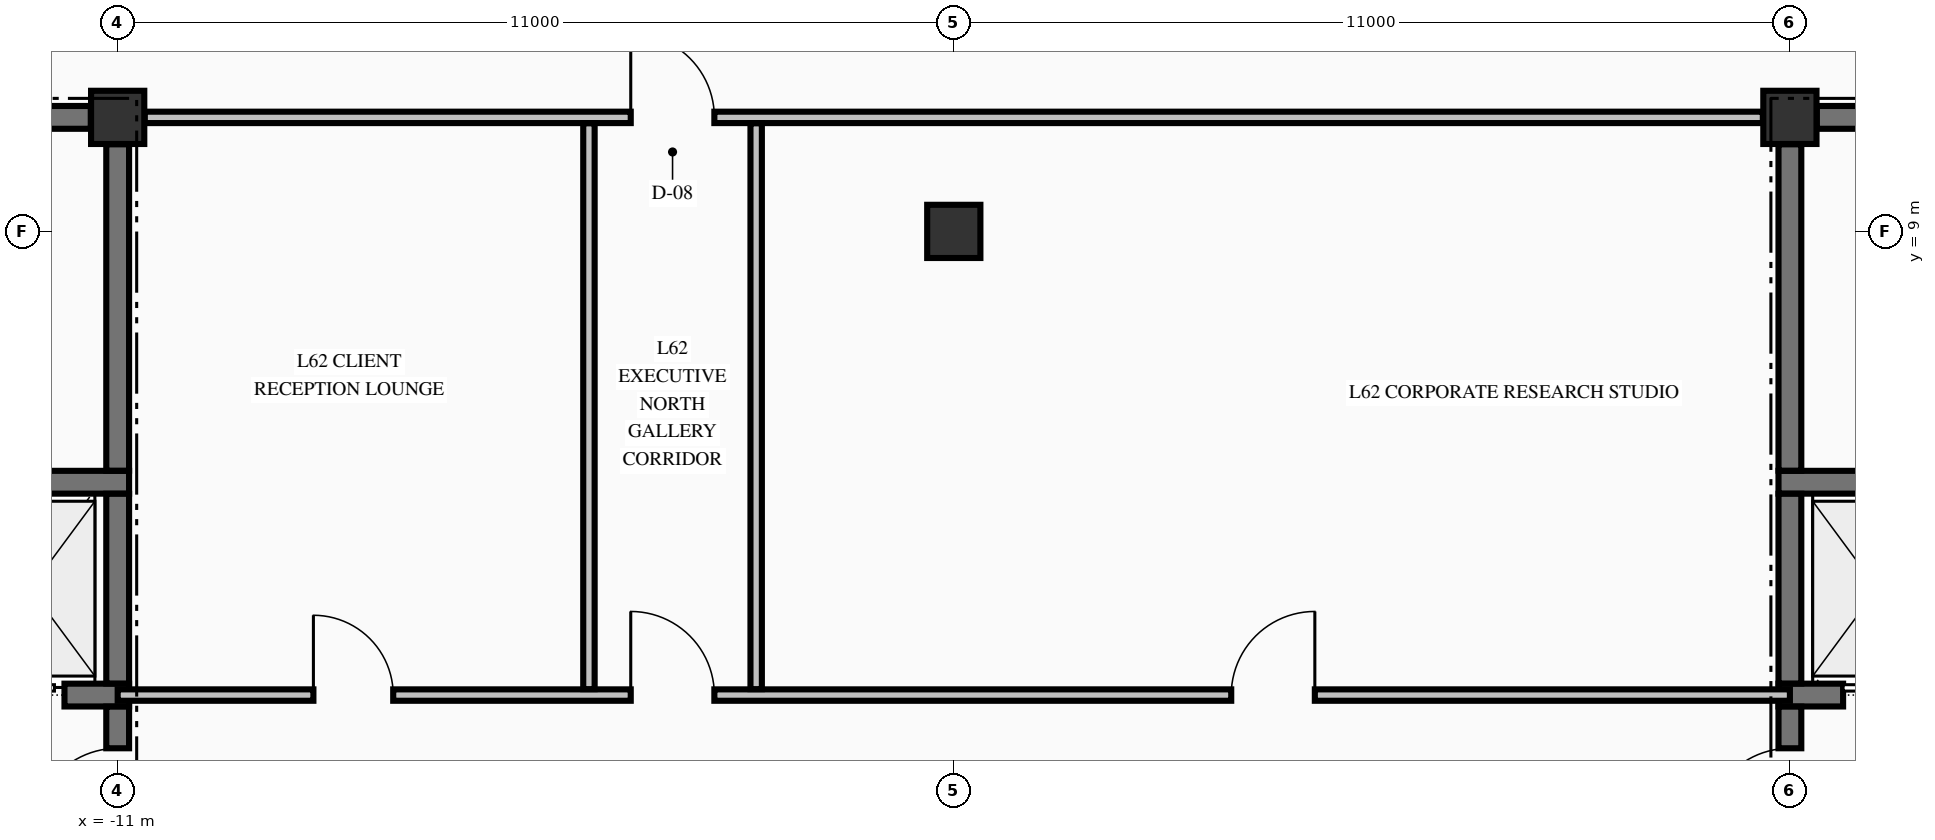
"""IFC4 building model, lengths in metres.
Left out: names, types, materials, properties, quantities, classifications, styles, units other than length and angle.
Written with IfcOpenShell. Run it as: python <this file> out.ifc"""

import sys

from ifc_helpers import new_model, si_unit, direction, frame, frame_2d, origin, origin_2d, place, context, subcontext, project, spatial, rectangle, extrude, element, fill, save


model = new_model("IFC4")
c1 = context("Model", 3, precision=1e-05, world=origin(), true_north=direction((0.0, 1.0)))
c2 = subcontext(c1, "Body", "Model", "MODEL_VIEW")
j1 = project(units=[si_unit("LENGTHUNIT", "METRE"), si_unit("PLANEANGLEUNIT", "RADIAN")], contexts=[c1])
p1 = place(None, origin())
s1 = spatial("IfcSite", under=j1, at=p1, CompositionType="ELEMENT")
p2 = place(p1, origin())
s2 = spatial("IfcBuilding", under=s1, at=p2, CompositionType="ELEMENT")
p3 = place(p2, frame((0.0, 0.0, 236.51)))
s3 = spatial("IfcBuildingStorey", under=s2, at=p3, CompositionType="ELEMENT", Elevation=236.51)
for number, where, z_axis, x_axis in (
    (1, (-11.0, 10.5, -0.25), (0.0, 0.0, 1.0), (1.0, 0.0, 0.0)),
    (2, (11.0, 10.5, -0.25), (0.0, 0.0, 1.0), (1.0, 0.0, 0.0)),
    (3, (0.0, 9.0, -0.25), (0.0, 0.0, 1.0), (1.0, 0.0, 0.0)),
):
    element("IfcColumn", number, at=place(p3, frame(where, z_axis=z_axis, x_axis=x_axis)), inside=s3, PredefinedType="COLUMN", context=c2, shape_type="SweptSolid", body=[
        extrude(rectangle(XDim=0.7, YDim=0.7, at=origin_2d()), origin(), (0.0, 0.0, 1.0), 3.23),
    ])
p4 = place(p3, frame((-14.875, 2.9, 0.0), z_axis=(0.0, 0.0, 1.0), x_axis=(1.0, 0.0, 0.0)))
e4 = element("IfcWall", 4, at=p4, inside=s3, PredefinedType="SHEAR", context=c2, shape_type="SweptSolid", body=[
    extrude(rectangle(XDim=4.025, YDim=0.3, at=frame_2d((2.012, 0.0))), origin(), (0.0, 0.0, 1.0), 2.98),
])
p5 = place(p4, frame((2.075, 0.0, 0.0)))
e5 = element("IfcOpeningElement", 5, at=p5, cuts=e4, PredefinedType="OPENING", context=c2, shape_type="SweptSolid", body=[
    extrude(rectangle(XDim=1.1, YDim=2.2, at=frame_2d((0.55, 1.1))), frame((0.0, 0.16, 0.0), z_axis=(0.0, -1.0, 0.0), x_axis=(1.0, 0.0, 0.0)), (0.0, 0.0, 1.0), 0.32),
])
p6 = place(p3, frame((10.85, 2.9, 0.0), z_axis=(0.0, 0.0, 1.0), x_axis=(1.0, 0.0, 0.0)))
e6 = element("IfcWall", 6, at=p6, inside=s3, PredefinedType="SHEAR", context=c2, shape_type="SweptSolid", body=[
    extrude(rectangle(XDim=4.025, YDim=0.3, at=frame_2d((2.012, 0.0))), origin(), (0.0, 0.0, 1.0), 2.98),
])
p7 = place(p6, frame((0.85, 0.0, 0.0)))
e7 = element("IfcOpeningElement", 7, at=p7, cuts=e6, PredefinedType="OPENING", context=c2, shape_type="SweptSolid", body=[
    extrude(rectangle(XDim=1.1, YDim=2.2, at=frame_2d((0.55, 1.1))), frame((0.0, 0.16, 0.0), z_axis=(0.0, -1.0, 0.0), x_axis=(1.0, 0.0, 0.0)), (0.0, 0.0, 1.0), 0.32),
])
for number, where, z_axis, x_axis in (
    (8, (-14.875, 5.7, 0.0), (0.0, 0.0, 1.0), (1.0, 0.0, 0.0)),
    (9, (10.85, 5.7, 0.0), (0.0, 0.0, 1.0), (1.0, 0.0, 0.0)),
):
    element("IfcWall", number, at=place(p3, frame(where, z_axis=z_axis, x_axis=x_axis)), inside=s3, PredefinedType="SHEAR", context=c2, shape_type="SweptSolid", body=[
        extrude(rectangle(XDim=4.025, YDim=0.3, at=frame_2d((2.012, 0.0))), origin(), (0.0, 0.0, 1.0), 2.98),
    ])
p8 = place(p3, frame((-14.7, 10.5, 0.0), z_axis=(0.0, 0.0, 1.0), x_axis=(1.0, 0.0, 0.0)))
e10 = element("IfcWall", 10, at=p8, inside=s3, PredefinedType="SHEAR", context=c2, shape_type="SweptSolid", body=[
    extrude(rectangle(XDim=3.346, YDim=0.3, at=frame_2d((1.673, 0.0))), origin(), (0.0, 0.0, 1.0), 2.98),
])
p9 = place(p8, frame((0.775, 0.0, 0.0)))
e11 = element("IfcOpeningElement", 11, at=p9, cuts=e10, PredefinedType="OPENING", context=c2, shape_type="SweptSolid", body=[
    extrude(rectangle(XDim=0.95, YDim=2.15, at=frame_2d((0.475, 1.075))), frame((0.0, 0.16, 0.0), z_axis=(0.0, -1.0, 0.0), x_axis=(1.0, 0.0, 0.0)), (0.0, 0.0, 1.0), 0.32),
])
p10 = place(p3, frame((11.354, 10.5, 0.0), z_axis=(0.0, 0.0, 1.0), x_axis=(1.0, 0.0, 0.0)))
e12 = element("IfcWall", 12, at=p10, inside=s3, PredefinedType="SHEAR", context=c2, shape_type="SweptSolid", body=[
    extrude(rectangle(XDim=3.346, YDim=0.3, at=frame_2d((1.673, 0.0))), origin(), (0.0, 0.0, 1.0), 2.98),
])
p11 = place(p10, frame((1.621, 0.0, 0.0)))
e13 = element("IfcOpeningElement", 13, at=p11, cuts=e12, PredefinedType="OPENING", context=c2, shape_type="SweptSolid", body=[
    extrude(rectangle(XDim=0.95, YDim=2.15, at=frame_2d((0.475, 1.075))), frame((0.0, 0.16, 0.0), z_axis=(0.0, -1.0, 0.0), x_axis=(1.0, 0.0, 0.0)), (0.0, 0.0, 1.0), 0.32),
])
p12 = place(p3, frame((-11.0, 2.9, 0.0), z_axis=(0.0, 0.0, 1.0), x_axis=(1.0, 0.0, 0.0)))
e14 = element("IfcWall", 14, at=p12, inside=s3, PredefinedType="PARTITIONING", context=c2, shape_type="SweptSolid", body=[
    extrude(rectangle(XDim=22.0, YDim=0.15, at=frame_2d((11.0, 0.0))), origin(), (0.0, 0.0, 1.0), 2.98),
])
p13 = place(p12, frame((6.75, 0.0, 0.0)))
e15 = element("IfcOpeningElement", 15, at=p13, cuts=e14, PredefinedType="OPENING", context=c2, shape_type="SweptSolid", body=[
    extrude(rectangle(XDim=1.1, YDim=2.15, at=frame_2d((0.55, 1.075))), frame((0.0, 0.085, 0.0), z_axis=(0.0, -1.0, 0.0), x_axis=(1.0, 0.0, 0.0)), (0.0, 0.0, 1.0), 0.17),
])
p14 = place(p12, frame((2.575, 0.0, 0.0)))
e16 = element("IfcOpeningElement", 16, at=p14, cuts=e14, PredefinedType="OPENING", context=c2, shape_type="SweptSolid", body=[
    extrude(rectangle(XDim=1.05, YDim=2.15, at=frame_2d((0.525, 1.075))), frame((0.0, 0.085, 0.0), z_axis=(0.0, -1.0, 0.0), x_axis=(1.0, 0.0, 0.0)), (0.0, 0.0, 1.0), 0.17),
])
p15 = place(p12, frame((14.65, 0.0, 0.0)))
e17 = element("IfcOpeningElement", 17, at=p15, cuts=e14, PredefinedType="OPENING", context=c2, shape_type="SweptSolid", body=[
    extrude(rectangle(XDim=1.1, YDim=2.15, at=frame_2d((0.55, 1.075))), frame((0.0, 0.085, 0.0), z_axis=(0.0, -1.0, 0.0), x_axis=(1.0, 0.0, 0.0)), (0.0, 0.0, 1.0), 0.17),
])
p16 = place(p3, frame((-10.644, 10.5, 0.0), z_axis=(0.0, 0.0, 1.0), x_axis=(1.0, 0.0, 0.0)))
e18 = element("IfcWall", 18, at=p16, inside=s3, PredefinedType="PARTITIONING", context=c2, shape_type="SweptSolid", body=[
    extrude(rectangle(XDim=21.288, YDim=0.15, at=frame_2d((10.644, 0.0))), origin(), (0.0, 0.0, 1.0), 2.98),
])
p17 = place(p16, frame((6.394, 0.0, 0.0)))
e19 = element("IfcOpeningElement", 19, at=p17, cuts=e18, PredefinedType="OPENING", context=c2, shape_type="SweptSolid", body=[
    extrude(rectangle(XDim=1.1, YDim=2.15, at=frame_2d((0.55, 1.075))), frame((0.0, 0.085, 0.0), z_axis=(0.0, -1.0, 0.0), x_axis=(1.0, 0.0, 0.0)), (0.0, 0.0, 1.0), 0.17),
])
p18 = place(p3, frame((-11.0, 0.354, 0.0), z_axis=(0.0, 0.0, 1.0), x_axis=(0.0, 1.0, 0.0)))
e20 = element("IfcWall", 20, at=p18, inside=s3, PredefinedType="SHEAR", context=c2, shape_type="SweptSolid", body=[
    extrude(rectangle(XDim=2.394, YDim=0.3, at=frame_2d((1.197, 0.0))), origin(), (0.0, 0.0, 1.0), 2.98),
])
p19 = place(p18, frame((0.746, 0.0, 0.0)))
e21 = element("IfcOpeningElement", 21, at=p19, cuts=e20, PredefinedType="OPENING", context=c2, shape_type="SweptSolid", body=[
    extrude(rectangle(XDim=1.1, YDim=2.15, at=frame_2d((0.55, 1.075))), frame((0.0, 0.16, 0.0), z_axis=(0.0, -1.0, 0.0), x_axis=(1.0, 0.0, 0.0)), (0.0, 0.0, 1.0), 0.32),
])
p20 = place(p3, frame((-11.0, 3.052, 0.0), z_axis=(0.0, 0.0, 1.0), x_axis=(0.0, 1.0, 0.0)))
e22 = element("IfcWall", 22, at=p20, inside=s3, PredefinedType="SHEAR", context=c2, shape_type="SweptSolid", body=[
    extrude(rectangle(XDim=2.496, YDim=0.3, at=frame_2d((1.248, 0.0))), origin(), (0.0, 0.0, 1.0), 2.98),
])
p21 = place(p3, frame((-11.0, 5.852, 0.0), z_axis=(0.0, 0.0, 1.0), x_axis=(0.0, 1.0, 0.0)))
e23 = element("IfcWall", 23, at=p21, inside=s3, PredefinedType="SHEAR", context=c2, shape_type="SweptSolid", body=[
    extrude(rectangle(XDim=4.294, YDim=0.3, at=frame_2d((2.147, 0.0))), origin(), (0.0, 0.0, 1.0), 2.98),
])
p22 = place(p3, frame((11.0, 0.354, 0.0), z_axis=(0.0, 0.0, 1.0), x_axis=(0.0, 1.0, 0.0)))
e24 = element("IfcWall", 24, at=p22, inside=s3, PredefinedType="SHEAR", context=c2, shape_type="SweptSolid", body=[
    extrude(rectangle(XDim=2.394, YDim=0.3, at=frame_2d((1.197, 0.0))), origin(), (0.0, 0.0, 1.0), 2.98),
])
p23 = place(p22, frame((0.746, 0.0, 0.0)))
e25 = element("IfcOpeningElement", 25, at=p23, cuts=e24, PredefinedType="OPENING", context=c2, shape_type="SweptSolid", body=[
    extrude(rectangle(XDim=1.1, YDim=2.15, at=frame_2d((0.55, 1.075))), frame((0.0, 0.16, 0.0), z_axis=(0.0, -1.0, 0.0), x_axis=(1.0, 0.0, 0.0)), (0.0, 0.0, 1.0), 0.32),
])
p24 = place(p3, frame((11.0, 3.052, 0.0), z_axis=(0.0, 0.0, 1.0), x_axis=(0.0, 1.0, 0.0)))
e26 = element("IfcWall", 26, at=p24, inside=s3, PredefinedType="SHEAR", context=c2, shape_type="SweptSolid", body=[
    extrude(rectangle(XDim=2.496, YDim=0.3, at=frame_2d((1.248, 0.0))), origin(), (0.0, 0.0, 1.0), 2.98),
])
p25 = place(p3, frame((11.0, 5.852, 0.0), z_axis=(0.0, 0.0, 1.0), x_axis=(0.0, 1.0, 0.0)))
e27 = element("IfcWall", 27, at=p25, inside=s3, PredefinedType="SHEAR", context=c2, shape_type="SweptSolid", body=[
    extrude(rectangle(XDim=4.294, YDim=0.3, at=frame_2d((2.147, 0.0))), origin(), (0.0, 0.0, 1.0), 2.98),
])
for number, where, z_axis, x_axis in (
    (28, (-4.8, 2.978, 0.0), (0.0, 0.0, 1.0), (0.0, 1.0, 0.0)),
    (29, (-2.6, 2.978, 0.0), (0.0, 0.0, 1.0), (0.0, 1.0, 0.0)),
):
    element("IfcWall", number, at=place(p3, frame(where, z_axis=z_axis, x_axis=x_axis)), inside=s3, PredefinedType="PARTITIONING", context=c2, shape_type="SweptSolid", body=[
        extrude(rectangle(XDim=7.444, YDim=0.15, at=frame_2d((3.722, 0.0))), origin(), (0.0, 0.0, 1.0), 2.98),
    ])
p26 = place(p19, origin())
e30 = element("IfcDoor", 30, at=p26, inside=s3, OperationType="SINGLE_SWING_LEFT", PredefinedType="DOOR", context=c2, shape_type="SweptSolid", body=[
    extrude(rectangle(XDim=1.1, YDim=2.15, at=frame_2d((0.55, 1.075))), frame((0.0, 0.025, 0.0), z_axis=(0.0, -1.0, 0.0), x_axis=(1.0, 0.0, 0.0)), (0.0, 0.0, 1.0), 0.05),
])
fill(e21, e30)
p27 = place(p5, origin())
e31 = element("IfcDoor", 31, at=p27, inside=s3, OperationType="SLIDING_TO_LEFT", PredefinedType="DOOR", context=c2, shape_type="SweptSolid", body=[
    extrude(rectangle(XDim=1.1, YDim=2.2, at=frame_2d((0.55, 1.1))), frame((0.0, 0.025, 0.0), z_axis=(0.0, -1.0, 0.0), x_axis=(1.0, 0.0, 0.0)), (0.0, 0.0, 1.0), 0.05),
])
fill(e5, e31)
p28 = place(p23, origin())
e32 = element("IfcDoor", 32, at=p28, inside=s3, OperationType="SINGLE_SWING_LEFT", PredefinedType="DOOR", context=c2, shape_type="SweptSolid", body=[
    extrude(rectangle(XDim=1.1, YDim=2.15, at=frame_2d((0.55, 1.075))), frame((0.0, 0.025, 0.0), z_axis=(0.0, -1.0, 0.0), x_axis=(1.0, 0.0, 0.0)), (0.0, 0.0, 1.0), 0.05),
])
fill(e25, e32)
p29 = place(p7, origin())
e33 = element("IfcDoor", 33, at=p29, inside=s3, OperationType="SLIDING_TO_RIGHT", PredefinedType="DOOR", context=c2, shape_type="SweptSolid", body=[
    extrude(rectangle(XDim=1.1, YDim=2.2, at=frame_2d((0.55, 1.1))), frame((0.0, 0.025, 0.0), z_axis=(0.0, -1.0, 0.0), x_axis=(1.0, 0.0, 0.0)), (0.0, 0.0, 1.0), 0.05),
])
fill(e7, e33)
p30 = place(p17, origin())
e34 = element("IfcDoor", 34, at=p30, inside=s3, OperationType="SINGLE_SWING_LEFT", PredefinedType="DOOR", context=c2, shape_type="SweptSolid", body=[
    extrude(rectangle(XDim=1.1, YDim=2.15, at=frame_2d((0.55, 1.075))), frame((0.0, 0.025, 0.0), z_axis=(0.0, -1.0, 0.0), x_axis=(1.0, 0.0, 0.0)), (0.0, 0.0, 1.0), 0.05),
])
fill(e19, e34)
p31 = place(p13, origin())
e35 = element("IfcDoor", 35, at=p31, inside=s3, OperationType="SINGLE_SWING_LEFT", PredefinedType="DOOR", context=c2, shape_type="SweptSolid", body=[
    extrude(rectangle(XDim=1.1, YDim=2.15, at=frame_2d((0.55, 1.075))), frame((0.0, 0.025, 0.0), z_axis=(0.0, -1.0, 0.0), x_axis=(1.0, 0.0, 0.0)), (0.0, 0.0, 1.0), 0.05),
])
fill(e15, e35)
p32 = place(p14, origin())
e36 = element("IfcDoor", 36, at=p32, inside=s3, OperationType="SINGLE_SWING_LEFT", PredefinedType="DOOR", context=c2, shape_type="SweptSolid", body=[
    extrude(rectangle(XDim=1.05, YDim=2.15, at=frame_2d((0.525, 1.075))), frame((0.0, 0.025, 0.0), z_axis=(0.0, -1.0, 0.0), x_axis=(1.0, 0.0, 0.0)), (0.0, 0.0, 1.0), 0.05),
])
fill(e16, e36)
p33 = place(p15, origin())
e37 = element("IfcDoor", 37, at=p33, inside=s3, OperationType="SINGLE_SWING_RIGHT", PredefinedType="DOOR", context=c2, shape_type="SweptSolid", body=[
    extrude(rectangle(XDim=1.1, YDim=2.15, at=frame_2d((0.55, 1.075))), frame((0.0, 0.025, 0.0), z_axis=(0.0, -1.0, 0.0), x_axis=(1.0, 0.0, 0.0)), (0.0, 0.0, 1.0), 0.05),
])
fill(e17, e37)
save(model, sys.argv[1])
